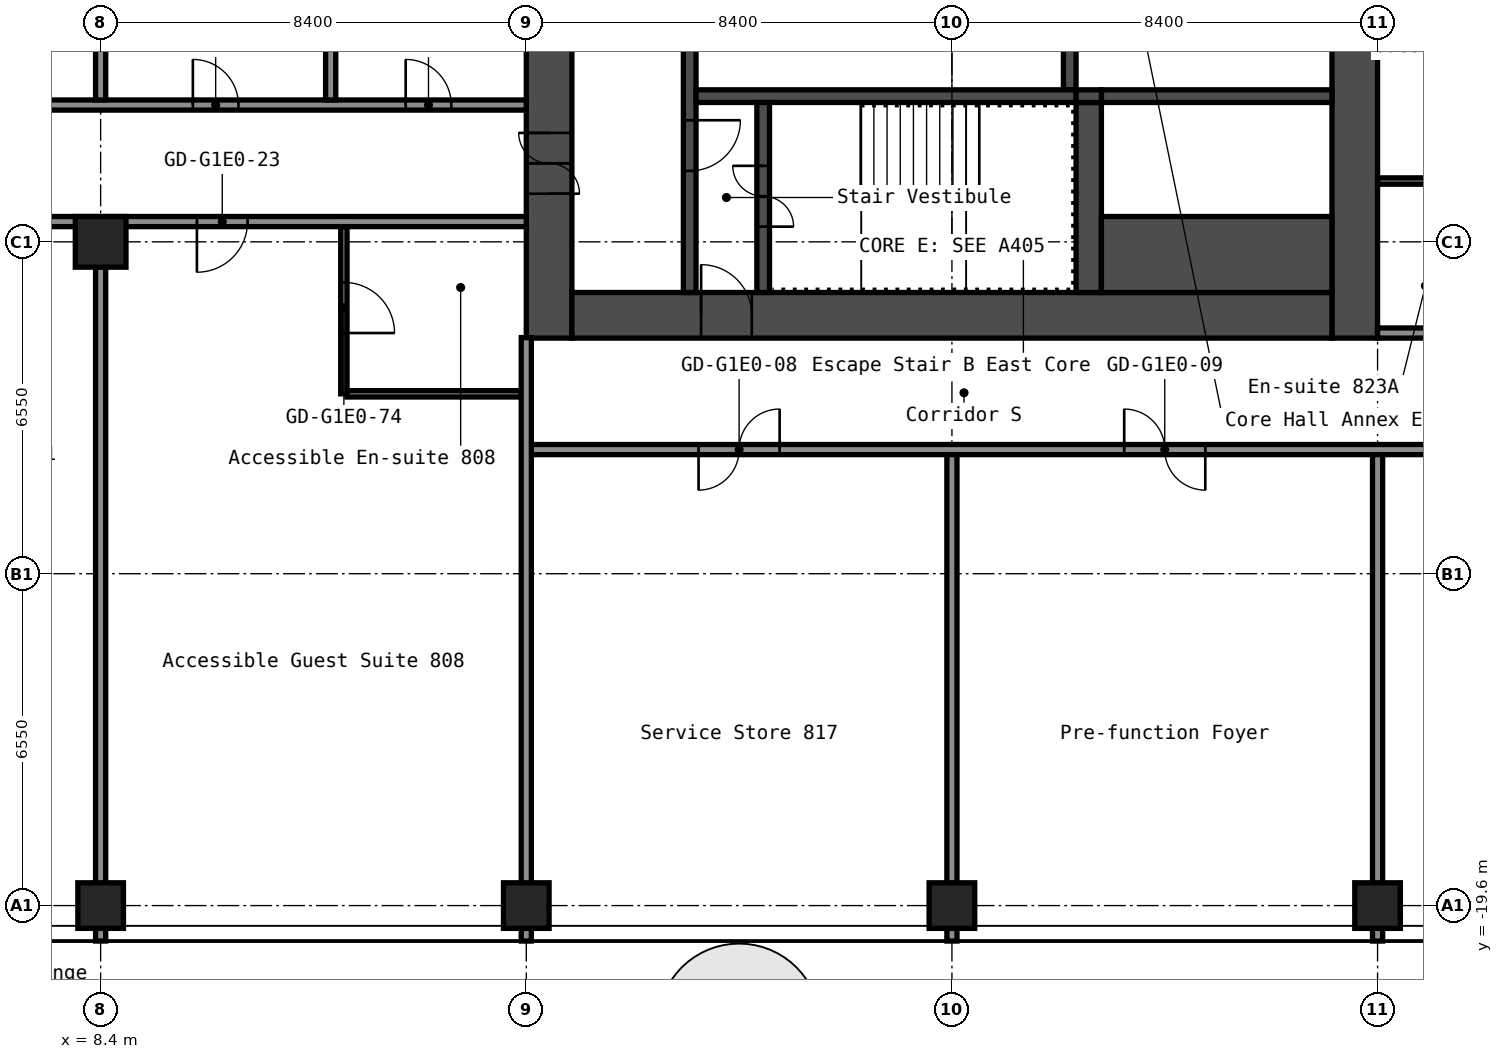
"""IFC4 building model, lengths in metres.
Left out: names, types, materials, properties, quantities, classifications, styles, units other than length and angle.
Written with IfcOpenShell. Run it as: python <this file> out.ifc"""

import sys

from ifc_helpers import new_model, si_unit, direction, frame, frame_2d, origin, origin_2d, place, context, subcontext, project, spatial, rectangle, hollow_rectangle, extrude, element, fill, save


model = new_model("IFC4")
c1 = context("Model", 3, precision=1e-05, world=origin(), true_north=direction((0.0, 1.0)))
c2 = subcontext(c1, "Body", "Model", "MODEL_VIEW")
j1 = project(units=[si_unit("LENGTHUNIT", "METRE"), si_unit("PLANEANGLEUNIT", "RADIAN")], contexts=[c1])
p1 = place(None, origin())
s1 = spatial("IfcSite", under=j1, at=p1, CompositionType="ELEMENT")
p2 = place(p1, origin())
s2 = spatial("IfcBuilding", under=s1, at=p2, CompositionType="ELEMENT")
p3 = place(p2, frame((0.0, 0.0, 32.6)))
s3 = spatial("IfcBuildingStorey", under=s2, at=p3, CompositionType="ELEMENT", Elevation=32.6)
p4 = place(p3, frame((8.4, -19.6, 0.0), z_axis=(0.0, 0.0, 1.0), x_axis=(1.0, 0.0, 0.0)))
e1 = element("IfcColumn", 1, at=p4, inside=s3, PredefinedType="COLUMN", context=c2, shape_type="SweptSolid", body=[
    extrude(hollow_rectangle(XDim=0.9, YDim=0.9, WallThickness=0.036, at=origin_2d()), origin(), (0.0, 0.0, 1.0), 2.8),
])
p5 = place(p3, frame((8.4, -6.5, 0.0), z_axis=(0.0, 0.0, 1.0), x_axis=(1.0, 0.0, 0.0)))
e2 = element("IfcColumn", 2, at=p5, inside=s3, PredefinedType="COLUMN", context=c2, shape_type="SweptSolid", body=[
    extrude(hollow_rectangle(XDim=1.0, YDim=1.0, WallThickness=0.04, at=origin_2d()), origin(), (0.0, 0.0, 1.0), 2.8),
])
for number, where, z_axis, x_axis in (
    (3, (16.8, -19.6, 0.0), (0.0, 0.0, 1.0), (1.0, 0.0, 0.0)),
    (4, (25.2, -19.6, 0.0), (0.0, 0.0, 1.0), (1.0, 0.0, 0.0)),
    (5, (33.6, -19.6, 0.0), (0.0, 0.0, 1.0), (1.0, 0.0, 0.0)),
):
    element("IfcColumn", number, at=place(p3, frame(where, z_axis=z_axis, x_axis=x_axis)), inside=s3, PredefinedType="COLUMN", context=c2, shape_type="SweptSolid", body=[
        extrude(hollow_rectangle(XDim=0.9, YDim=0.9, WallThickness=0.036, at=origin_2d()), origin(), (0.0, 0.0, 1.0), 2.8),
    ])
p6 = place(p3, frame((17.25, -8.4, 0.0), z_axis=(0.0, 0.0, 1.0), x_axis=(0.0, 1.0, 0.0)))
e6 = element("IfcWall", 6, at=p6, inside=s3, PredefinedType="SHEAR", context=c2, shape_type="SweptSolid", body=[
    extrude(rectangle(XDim=16.8, YDim=0.9, at=frame_2d((8.4, 0.0))), origin(), (0.0, 0.0, 1.0), 2.8),
])
p7 = place(p6, frame((12.75, 0.0, 0.0)))
e7 = element("IfcOpeningElement", 7, at=p7, cuts=e6, PredefinedType="OPENING", context=c2, shape_type="SweptSolid", body=[
    extrude(rectangle(XDim=1.2, YDim=2.1, at=frame_2d((0.6, 1.05))), frame((0.0, 0.46, 0.0), z_axis=(0.0, -1.0, 0.0), x_axis=(1.0, 0.0, 0.0)), (0.0, 0.0, 1.0), 0.92),
])
p8 = place(p6, frame((2.85, 0.0, 0.0)))
e8 = element("IfcOpeningElement", 8, at=p8, cuts=e6, PredefinedType="OPENING", context=c2, shape_type="SweptSolid", body=[
    extrude(rectangle(XDim=1.2, YDim=2.1, at=frame_2d((0.6, 1.05))), frame((0.0, 0.46, 0.0), z_axis=(0.0, -1.0, 0.0), x_axis=(1.0, 0.0, 0.0)), (0.0, 0.0, 1.0), 0.92),
])
p9 = place(p3, frame((33.15, -8.4, 0.0), z_axis=(0.0, 0.0, 1.0), x_axis=(0.0, 1.0, 0.0)))
e9 = element("IfcWall", 9, at=p9, inside=s3, PredefinedType="SHEAR", context=c2, shape_type="SweptSolid", body=[
    extrude(rectangle(XDim=16.8, YDim=0.9, at=frame_2d((8.4, 0.0))), origin(), (0.0, 0.0, 1.0), 2.8),
])
p10 = place(p3, frame((17.7, -7.95, 0.0), z_axis=(0.0, 0.0, 1.0), x_axis=(1.0, 0.0, 0.0)))
e10 = element("IfcWall", 10, at=p10, inside=s3, PredefinedType="SHEAR", context=c2, shape_type="SweptSolid", body=[
    extrude(rectangle(XDim=15.0, YDim=0.9, at=frame_2d((7.5, 0.0))), origin(), (0.0, 0.0, 1.0), 2.8),
])
p11 = place(p10, frame((2.55, 0.0, 0.0)))
e11 = element("IfcOpeningElement", 11, at=p11, cuts=e10, PredefinedType="OPENING", context=c2, shape_type="SweptSolid", body=[
    extrude(rectangle(XDim=1.0, YDim=2.1, at=frame_2d((0.5, 1.05))), frame((0.0, 0.46, 0.0), z_axis=(0.0, -1.0, 0.0), x_axis=(1.0, 0.0, 0.0)), (0.0, 0.0, 1.0), 0.92),
])
p12 = place(p3, frame((20.025, -7.5, 0.0), z_axis=(0.0, 0.0, 1.0), x_axis=(0.0, 1.0, 0.0)))
e12 = element("IfcWall", 12, at=p12, inside=s3, PredefinedType="SHEAR", context=c2, shape_type="SweptSolid", body=[
    extrude(rectangle(XDim=6.3, YDim=0.25, at=frame_2d((3.15, 0.0))), origin(), (0.0, 0.0, 1.0), 2.8),
])
p13 = place(p12, frame((2.4, 0.0, 0.0)))
e13 = element("IfcOpeningElement", 13, at=p13, cuts=e12, PredefinedType="OPENING", context=c2, shape_type="SweptSolid", body=[
    extrude(rectangle(XDim=1.0, YDim=2.1, at=frame_2d((0.5, 1.05))), frame((0.0, 0.135, 0.0), z_axis=(0.0, -1.0, 0.0), x_axis=(1.0, 0.0, 0.0)), (0.0, 0.0, 1.0), 0.27),
])
p14 = place(p3, frame((27.525, -3.5, 0.0), z_axis=(0.0, 0.0, 1.0), x_axis=(0.0, 1.0, 0.0)))
e14 = element("IfcWall", 14, at=p14, inside=s3, PredefinedType="SHEAR", context=c2, shape_type="SweptSolid", body=[
    extrude(rectangle(XDim=2.05, YDim=0.25, at=frame_2d((1.025, 0.0))), origin(), (0.0, 0.0, 1.0), 2.8),
])
p15 = place(p3, frame((20.15, -3.625, 0.0), z_axis=(0.0, 0.0, 1.0), x_axis=(1.0, 0.0, 0.0)))
e15 = element("IfcWall", 15, at=p15, inside=s3, PredefinedType="SHEAR", context=c2, shape_type="SweptSolid", body=[
    extrude(rectangle(XDim=7.5, YDim=0.25, at=frame_2d((3.75, 0.0))), origin(), (0.0, 0.0, 1.0), 2.8),
])
p16 = place(p3, frame((21.475, -7.5, 0.0), z_axis=(0.0, 0.0, 1.0), x_axis=(0.0, 1.0, 0.0)))
e16 = element("IfcWall", 16, at=p16, inside=s3, PredefinedType="SHEAR", context=c2, shape_type="SweptSolid", body=[
    extrude(rectangle(XDim=3.75, YDim=0.25, at=frame_2d((1.875, 0.0))), origin(), (0.0, 0.0, 1.0), 2.8),
])
p17 = place(p16, frame((1.3, 0.0, 0.0)))
e17 = element("IfcOpeningElement", 17, at=p17, cuts=e16, PredefinedType="OPENING", context=c2, shape_type="SweptSolid", body=[
    extrude(rectangle(XDim=1.2, YDim=2.1, at=frame_2d((0.6, 1.05))), frame((0.0, 0.135, 0.0), z_axis=(0.0, -1.0, 0.0), x_axis=(1.0, 0.0, 0.0)), (0.0, 0.0, 1.0), 0.27),
])
p18 = place(p3, frame((27.9, -7.5, 0.0), z_axis=(0.0, 0.0, 1.0), x_axis=(0.0, 1.0, 0.0)))
e18 = element("IfcWall", 18, at=p18, inside=s3, PredefinedType="SHEAR", context=c2, shape_type="SweptSolid", body=[
    extrude(rectangle(XDim=3.75, YDim=0.5, at=frame_2d((1.875, 0.0))), origin(), (0.0, 0.0, 1.0), 2.8),
])
p19 = place(p3, frame((28.15, -3.625, 0.0), z_axis=(0.0, 0.0, 1.0), x_axis=(1.0, 0.0, 0.0)))
e19 = element("IfcWall", 19, at=p19, inside=s3, PredefinedType="SHEAR", context=c2, shape_type="SweptSolid", body=[
    extrude(rectangle(XDim=4.55, YDim=0.25, at=frame_2d((2.275, 0.0))), origin(), (0.0, 0.0, 1.0), 2.8),
])
p20 = place(p3, frame((28.15, -6.75, 0.0), z_axis=(0.0, 0.0, 1.0), x_axis=(1.0, 0.0, 0.0)))
e20 = element("IfcWall", 20, at=p20, inside=s3, PredefinedType="SHEAR", context=c2, shape_type="SweptSolid", body=[
    extrude(rectangle(XDim=4.55, YDim=1.5, at=frame_2d((2.275, 0.0))), origin(), (0.0, 0.0, 1.0), 2.8),
])
p21 = place(p3, frame((27.65, -3.625, 0.0), z_axis=(0.0, 0.0, 1.0), x_axis=(1.0, 0.0, 0.0)))
e21 = element("IfcWall", 21, at=p21, inside=s3, PredefinedType="SHEAR", context=c2, shape_type="SweptSolid", body=[
    extrude(rectangle(XDim=0.5, YDim=0.25, at=frame_2d((0.25, 0.0))), origin(), (0.0, 0.0, 1.0), 2.8),
])
p22 = place(p3, frame((16.8, -10.6, 0.0), z_axis=(0.0, 0.0, 1.0), x_axis=(1.0, 0.0, 0.0)))
e22 = element("IfcWall", 22, at=p22, inside=s3, PredefinedType="PARTITIONING", context=c2, shape_type="SweptSolid", body=[
    extrude(rectangle(XDim=34.3, YDim=0.2, at=frame_2d((17.15, 0.0))), origin(), (0.0, 0.0, 1.0), 2.8),
])
p23 = place(p22, frame((3.4, 0.0, 0.0)))
e23 = element("IfcOpeningElement", 23, at=p23, cuts=e22, PredefinedType="OPENING", context=c2, shape_type="SweptSolid", body=[
    extrude(rectangle(XDim=1.6, YDim=2.1, at=frame_2d((0.8, 1.05))), frame((0.0, 0.11, 0.0), z_axis=(0.0, -1.0, 0.0), x_axis=(1.0, 0.0, 0.0)), (0.0, 0.0, 1.0), 0.22),
])
p24 = place(p22, frame((11.8, 0.0, 0.0)))
e24 = element("IfcOpeningElement", 24, at=p24, cuts=e22, PredefinedType="OPENING", context=c2, shape_type="SweptSolid", body=[
    extrude(rectangle(XDim=1.6, YDim=2.1, at=frame_2d((0.8, 1.05))), frame((0.0, 0.11, 0.0), z_axis=(0.0, -1.0, 0.0), x_axis=(1.0, 0.0, 0.0)), (0.0, 0.0, 1.0), 0.22),
])
p25 = place(p22, frame((20.2, 0.0, 0.0)))
e25 = element("IfcOpeningElement", 25, at=p25, cuts=e22, PredefinedType="OPENING", context=c2, shape_type="SweptSolid", body=[
    extrude(rectangle(XDim=1.6, YDim=2.1, at=frame_2d((0.8, 1.05))), frame((0.0, 0.11, 0.0), z_axis=(0.0, -1.0, 0.0), x_axis=(1.0, 0.0, 0.0)), (0.0, 0.0, 1.0), 0.22),
])
p26 = place(p22, frame((28.8, 0.0, 0.0)))
e26 = element("IfcOpeningElement", 26, at=p26, cuts=e22, PredefinedType="OPENING", context=c2, shape_type="SweptSolid", body=[
    extrude(rectangle(XDim=1.6, YDim=2.1, at=frame_2d((0.8, 1.05))), frame((0.0, 0.11, 0.0), z_axis=(0.0, -1.0, 0.0), x_axis=(1.0, 0.0, 0.0)), (0.0, 0.0, 1.0), 0.22),
])
p27 = place(p3, frame((13.262, -9.5, 0.0), z_axis=(0.0, 0.0, 1.0), x_axis=(1.0, 0.0, 0.0)))
e27 = element("IfcWall", 27, at=p27, inside=s3, PredefinedType="PARTITIONING", context=c2, shape_type="SweptSolid", body=[
    extrude(rectangle(XDim=3.438, YDim=0.125, at=frame_2d((1.719, 0.0))), origin(), (0.0, 0.0, 1.0), 2.8),
])
p28 = place(p3, frame((33.6, -8.3, 0.0), z_axis=(0.0, 0.0, 1.0), x_axis=(1.0, 0.0, 0.0)))
e28 = element("IfcWall", 28, at=p28, inside=s3, PredefinedType="PARTITIONING", context=c2, shape_type="SweptSolid", body=[
    extrude(rectangle(XDim=15.0, YDim=0.2, at=frame_2d((7.5, 0.0))), origin(), (0.0, 0.0, 1.0), 2.8),
])
p29 = place(p28, frame((2.85, 0.0, 0.0)))
e29 = element("IfcOpeningElement", 29, at=p29, cuts=e28, PredefinedType="OPENING", context=c2, shape_type="SweptSolid", body=[
    extrude(rectangle(XDim=1.0, YDim=2.1, at=frame_2d((0.5, 1.05))), frame((0.0, 0.11, 0.0), z_axis=(0.0, -1.0, 0.0), x_axis=(1.0, 0.0, 0.0)), (0.0, 0.0, 1.0), 0.22),
])
p30 = place(p28, frame((4.55, 0.0, 0.0)))
e30 = element("IfcOpeningElement", 30, at=p30, cuts=e28, PredefinedType="OPENING", context=c2, shape_type="SweptSolid", body=[
    extrude(rectangle(XDim=1.0, YDim=2.1, at=frame_2d((0.5, 1.05))), frame((0.0, 0.11, 0.0), z_axis=(0.0, -1.0, 0.0), x_axis=(1.0, 0.0, 0.0)), (0.0, 0.0, 1.0), 0.22),
])
p31 = place(p28, frame((9.5, 0.0, 0.0)))
e31 = element("IfcOpeningElement", 31, at=p31, cuts=e28, PredefinedType="OPENING", context=c2, shape_type="SweptSolid", body=[
    extrude(rectangle(XDim=1.0, YDim=2.1, at=frame_2d((0.5, 1.05))), frame((0.0, 0.11, 0.0), z_axis=(0.0, -1.0, 0.0), x_axis=(1.0, 0.0, 0.0)), (0.0, 0.0, 1.0), 0.22),
])
p32 = place(p3, frame((-16.8, -6.1, 0.0), z_axis=(0.0, 0.0, 1.0), x_axis=(1.0, 0.0, 0.0)))
e32 = element("IfcWall", 32, at=p32, inside=s3, PredefinedType="PARTITIONING", context=c2, shape_type="SweptSolid", body=[
    extrude(rectangle(XDim=33.6, YDim=0.2, at=frame_2d((16.8, 0.0))), origin(), (0.0, 0.0, 1.0), 2.8),
])
p33 = place(p32, frame((1.6, 0.0, 0.0)))
e33 = element("IfcOpeningElement", 33, at=p33, cuts=e32, PredefinedType="OPENING", context=c2, shape_type="SweptSolid", body=[
    extrude(rectangle(XDim=1.0, YDim=2.1, at=frame_2d((0.5, 1.05))), frame((0.0, 0.11, 0.0), z_axis=(0.0, -1.0, 0.0), x_axis=(1.0, 0.0, 0.0)), (0.0, 0.0, 1.0), 0.22),
])
p34 = place(p32, frame((10.0, 0.0, 0.0)))
e34 = element("IfcOpeningElement", 34, at=p34, cuts=e32, PredefinedType="OPENING", context=c2, shape_type="SweptSolid", body=[
    extrude(rectangle(XDim=1.0, YDim=2.1, at=frame_2d((0.5, 1.05))), frame((0.0, 0.11, 0.0), z_axis=(0.0, -1.0, 0.0), x_axis=(1.0, 0.0, 0.0)), (0.0, 0.0, 1.0), 0.22),
])
p35 = place(p32, frame((22.6, 0.0, 0.0)))
e35 = element("IfcOpeningElement", 35, at=p35, cuts=e32, PredefinedType="OPENING", context=c2, shape_type="SweptSolid", body=[
    extrude(rectangle(XDim=1.0, YDim=2.1, at=frame_2d((0.5, 1.05))), frame((0.0, 0.11, 0.0), z_axis=(0.0, -1.0, 0.0), x_axis=(1.0, 0.0, 0.0)), (0.0, 0.0, 1.0), 0.22),
])
p36 = place(p32, frame((27.1, 0.0, 0.0)))
e36 = element("IfcOpeningElement", 36, at=p36, cuts=e32, PredefinedType="OPENING", context=c2, shape_type="SweptSolid", body=[
    extrude(rectangle(XDim=1.0, YDim=2.1, at=frame_2d((0.5, 1.05))), frame((0.0, 0.11, 0.0), z_axis=(0.0, -1.0, 0.0), x_axis=(1.0, 0.0, 0.0)), (0.0, 0.0, 1.0), 0.22),
])
p37 = place(p3, frame((33.6, -5.3, 0.0), z_axis=(0.0, 0.0, 1.0), x_axis=(1.0, 0.0, 0.0)))
e37 = element("IfcWall", 37, at=p37, inside=s3, PredefinedType="PARTITIONING", context=c2, shape_type="SweptSolid", body=[
    extrude(rectangle(XDim=2.438, YDim=0.125, at=frame_2d((1.219, 0.0))), origin(), (0.0, 0.0, 1.0), 2.8),
])
p38 = place(p3, frame((-16.8, -3.8, 0.0), z_axis=(0.0, 0.0, 1.0), x_axis=(1.0, 0.0, 0.0)))
e38 = element("IfcWall", 38, at=p38, inside=s3, PredefinedType="PARTITIONING", context=c2, shape_type="SweptSolid", body=[
    extrude(rectangle(XDim=33.6, YDim=0.2, at=frame_2d((16.8, 0.0))), origin(), (0.0, 0.0, 1.0), 2.8),
])
p39 = place(p38, frame((10.3, 0.0, 0.0)))
e39 = element("IfcOpeningElement", 39, at=p39, cuts=e38, PredefinedType="OPENING", context=c2, shape_type="SweptSolid", body=[
    extrude(rectangle(XDim=0.9, YDim=2.1, at=frame_2d((0.45, 1.05))), frame((0.0, 0.11, 0.0), z_axis=(0.0, -1.0, 0.0), x_axis=(1.0, 0.0, 0.0)), (0.0, 0.0, 1.0), 0.22),
])
p40 = place(p38, frame((14.5, 0.0, 0.0)))
e40 = element("IfcOpeningElement", 40, at=p40, cuts=e38, PredefinedType="OPENING", context=c2, shape_type="SweptSolid", body=[
    extrude(rectangle(XDim=0.9, YDim=2.1, at=frame_2d((0.45, 1.05))), frame((0.0, 0.11, 0.0), z_axis=(0.0, -1.0, 0.0), x_axis=(1.0, 0.0, 0.0)), (0.0, 0.0, 1.0), 0.22),
])
p41 = place(p38, frame((27.02, 0.0, 0.0)))
e41 = element("IfcOpeningElement", 41, at=p41, cuts=e38, PredefinedType="OPENING", context=c2, shape_type="SweptSolid", body=[
    extrude(rectangle(XDim=0.9, YDim=2.1, at=frame_2d((0.45, 1.05))), frame((0.0, 0.11, 0.0), z_axis=(0.0, -1.0, 0.0), x_axis=(1.0, 0.0, 0.0)), (0.0, 0.0, 1.0), 0.22),
])
p42 = place(p38, frame((31.22, 0.0, 0.0)))
e42 = element("IfcOpeningElement", 42, at=p42, cuts=e38, PredefinedType="OPENING", context=c2, shape_type="SweptSolid", body=[
    extrude(rectangle(XDim=0.9, YDim=2.1, at=frame_2d((0.45, 1.05))), frame((0.0, 0.11, 0.0), z_axis=(0.0, -1.0, 0.0), x_axis=(1.0, 0.0, 0.0)), (0.0, 0.0, 1.0), 0.22),
])
p43 = place(p3, frame((8.4, -20.3, 0.0), z_axis=(0.0, 0.0, 1.0), x_axis=(0.0, 1.0, 0.0)))
e43 = element("IfcWall", 43, at=p43, inside=s3, PredefinedType="PARTITIONING", context=c2, shape_type="SweptSolid", body=[
    extrude(rectangle(XDim=13.31, YDim=0.2, at=frame_2d((6.655, 0.0))), origin(), (0.0, 0.0, 1.0), 2.8),
])
for number, where, z_axis, x_axis in (
    (44, (8.4, -3.7, 0.0), (0.0, 0.0, 1.0), (0.0, 1.0, 0.0)),
    (45, (12.94, -3.7, 0.0), (0.0, 0.0, 1.0), (0.0, 1.0, 0.0)),
):
    element("IfcWall", number, at=place(p3, frame(where, z_axis=z_axis, x_axis=x_axis)), inside=s3, PredefinedType="PARTITIONING", context=c2, shape_type="SweptSolid", body=[
        extrude(rectangle(XDim=7.4, YDim=0.2, at=frame_2d((3.7, 0.0))), origin(), (0.0, 0.0, 1.0), 2.8),
    ])
p44 = place(p3, frame((13.2, -9.5, 0.0), z_axis=(0.0, 0.0, 1.0), x_axis=(0.0, 1.0, 0.0)))
e46 = element("IfcWall", 46, at=p44, inside=s3, PredefinedType="PARTITIONING", context=c2, shape_type="SweptSolid", body=[
    extrude(rectangle(XDim=3.3, YDim=0.125, at=frame_2d((1.65, 0.0))), origin(), (0.0, 0.0, 1.0), 2.8),
])
p45 = place(p44, frame((1.2, 0.0, 0.0)))
e47 = element("IfcOpeningElement", 47, at=p45, cuts=e46, PredefinedType="OPENING", context=c2, shape_type="SweptSolid", body=[
    extrude(rectangle(XDim=1.0, YDim=2.1, at=frame_2d((0.5, 1.05))), frame((0.0, 0.073, 0.0), z_axis=(0.0, -1.0, 0.0), x_axis=(1.0, 0.0, 0.0)), (0.0, 0.0, 1.0), 0.145),
])
p46 = place(p3, frame((16.8, -20.3, 0.0), z_axis=(0.0, 0.0, 1.0), x_axis=(0.0, 1.0, 0.0)))
e48 = element("IfcWall", 48, at=p46, inside=s3, PredefinedType="PARTITIONING", context=c2, shape_type="SweptSolid", body=[
    extrude(rectangle(XDim=11.91, YDim=0.2, at=frame_2d((5.955, 0.0))), origin(), (0.0, 0.0, 1.0), 2.8),
])
for number, where, z_axis, x_axis in (
    (49, (25.2, -20.3, 0.0), (0.0, 0.0, 1.0), (0.0, 1.0, 0.0)),
    (50, (33.6, -20.3, 0.0), (0.0, 0.0, 1.0), (0.0, 1.0, 0.0)),
):
    element("IfcWall", number, at=place(p3, frame(where, z_axis=z_axis, x_axis=x_axis)), inside=s3, PredefinedType="PARTITIONING", context=c2, shape_type="SweptSolid", body=[
        extrude(rectangle(XDim=9.6, YDim=0.2, at=frame_2d((4.8, 0.0))), origin(), (0.0, 0.0, 1.0), 2.8),
    ])
p47 = place(p8, origin())
e51 = element("IfcDoor", 51, at=p47, inside=s3, OperationType="DOUBLE_DOOR_SINGLE_SWING", PredefinedType="DOOR", context=c2, shape_type="SweptSolid", body=[
    extrude(rectangle(XDim=1.2, YDim=2.1, at=frame_2d((0.6, 1.05))), frame((0.0, 0.025, 0.0), z_axis=(0.0, -1.0, 0.0), x_axis=(1.0, 0.0, 0.0)), (0.0, 0.0, 1.0), 0.05),
])
fill(e8, e51)
p48 = place(p11, origin())
e52 = element("IfcDoor", 52, at=p48, inside=s3, OperationType="SINGLE_SWING_RIGHT", PredefinedType="DOOR", context=c2, shape_type="SweptSolid", body=[
    extrude(rectangle(XDim=1.0, YDim=2.1, at=frame_2d((0.5, 1.05))), frame((0.0, 0.025, 0.0), z_axis=(0.0, -1.0, 0.0), x_axis=(1.0, 0.0, 0.0)), (0.0, 0.0, 1.0), 0.05),
])
fill(e11, e52)
p49 = place(p17, origin())
e53 = element("IfcDoor", 53, at=p49, inside=s3, OperationType="DOUBLE_DOOR_SINGLE_SWING", PredefinedType="DOOR", context=c2, shape_type="SweptSolid", body=[
    extrude(rectangle(XDim=1.2, YDim=2.1, at=frame_2d((0.6, 1.05))), frame((0.0, 0.025, 0.0), z_axis=(0.0, -1.0, 0.0), x_axis=(1.0, 0.0, 0.0)), (0.0, 0.0, 1.0), 0.05),
])
fill(e17, e53)
p50 = place(p13, origin())
e54 = element("IfcDoor", 54, at=p50, inside=s3, OperationType="SINGLE_SWING_RIGHT", PredefinedType="DOOR", context=c2, shape_type="SweptSolid", body=[
    extrude(rectangle(XDim=1.0, YDim=2.1, at=frame_2d((0.5, 1.05))), frame((0.0, 0.025, 0.0), z_axis=(0.0, -1.0, 0.0), x_axis=(1.0, 0.0, 0.0)), (0.0, 0.0, 1.0), 0.05),
])
fill(e13, e54)
p51 = place(p23, origin())
e55 = element("IfcDoor", 55, at=p51, inside=s3, OperationType="DOUBLE_DOOR_SINGLE_SWING", PredefinedType="DOOR", context=c2, shape_type="SweptSolid", body=[
    extrude(rectangle(XDim=1.6, YDim=2.1, at=frame_2d((0.8, 1.05))), frame((0.0, 0.025, 0.0), z_axis=(0.0, -1.0, 0.0), x_axis=(1.0, 0.0, 0.0)), (0.0, 0.0, 1.0), 0.05),
])
fill(e23, e55)
p52 = place(p24, origin())
e56 = element("IfcDoor", 56, at=p52, inside=s3, OperationType="DOUBLE_DOOR_SINGLE_SWING", PredefinedType="DOOR", context=c2, shape_type="SweptSolid", body=[
    extrude(rectangle(XDim=1.6, YDim=2.1, at=frame_2d((0.8, 1.05))), frame((0.0, 0.025, 0.0), z_axis=(0.0, -1.0, 0.0), x_axis=(1.0, 0.0, 0.0)), (0.0, 0.0, 1.0), 0.05),
])
fill(e24, e56)
p53 = place(p36, origin())
e57 = element("IfcDoor", 57, at=p53, inside=s3, OperationType="SINGLE_SWING_LEFT", PredefinedType="DOOR", context=c2, shape_type="SweptSolid", body=[
    extrude(rectangle(XDim=1.0, YDim=2.1, at=frame_2d((0.5, 1.05))), frame((0.0, 0.025, 0.0), z_axis=(0.0, -1.0, 0.0), x_axis=(1.0, 0.0, 0.0)), (0.0, 0.0, 1.0), 0.05),
])
fill(e36, e57)
p54 = place(p41, origin())
e58 = element("IfcDoor", 58, at=p54, inside=s3, OperationType="SINGLE_SWING_RIGHT", PredefinedType="DOOR", context=c2, shape_type="SweptSolid", body=[
    extrude(rectangle(XDim=0.9, YDim=2.1, at=frame_2d((0.45, 1.05))), frame((0.0, 0.025, 0.0), z_axis=(0.0, -1.0, 0.0), x_axis=(1.0, 0.0, 0.0)), (0.0, 0.0, 1.0), 0.05),
])
fill(e41, e58)
p55 = place(p42, origin())
e59 = element("IfcDoor", 59, at=p55, inside=s3, OperationType="SINGLE_SWING_RIGHT", PredefinedType="DOOR", context=c2, shape_type="SweptSolid", body=[
    extrude(rectangle(XDim=0.9, YDim=2.1, at=frame_2d((0.45, 1.05))), frame((0.0, 0.025, 0.0), z_axis=(0.0, -1.0, 0.0), x_axis=(1.0, 0.0, 0.0)), (0.0, 0.0, 1.0), 0.05),
])
fill(e42, e59)
p56 = place(p45, origin())
e60 = element("IfcDoor", 60, at=p56, inside=s3, OperationType="SINGLE_SWING_LEFT", PredefinedType="DOOR", context=c2, shape_type="SweptSolid", body=[
    extrude(rectangle(XDim=1.0, YDim=2.1, at=frame_2d((0.5, 1.05))), frame((0.0, 0.025, 0.0), z_axis=(0.0, -1.0, 0.0), x_axis=(1.0, 0.0, 0.0)), (0.0, 0.0, 1.0), 0.05),
])
fill(e47, e60)
save(model, sys.argv[1])
